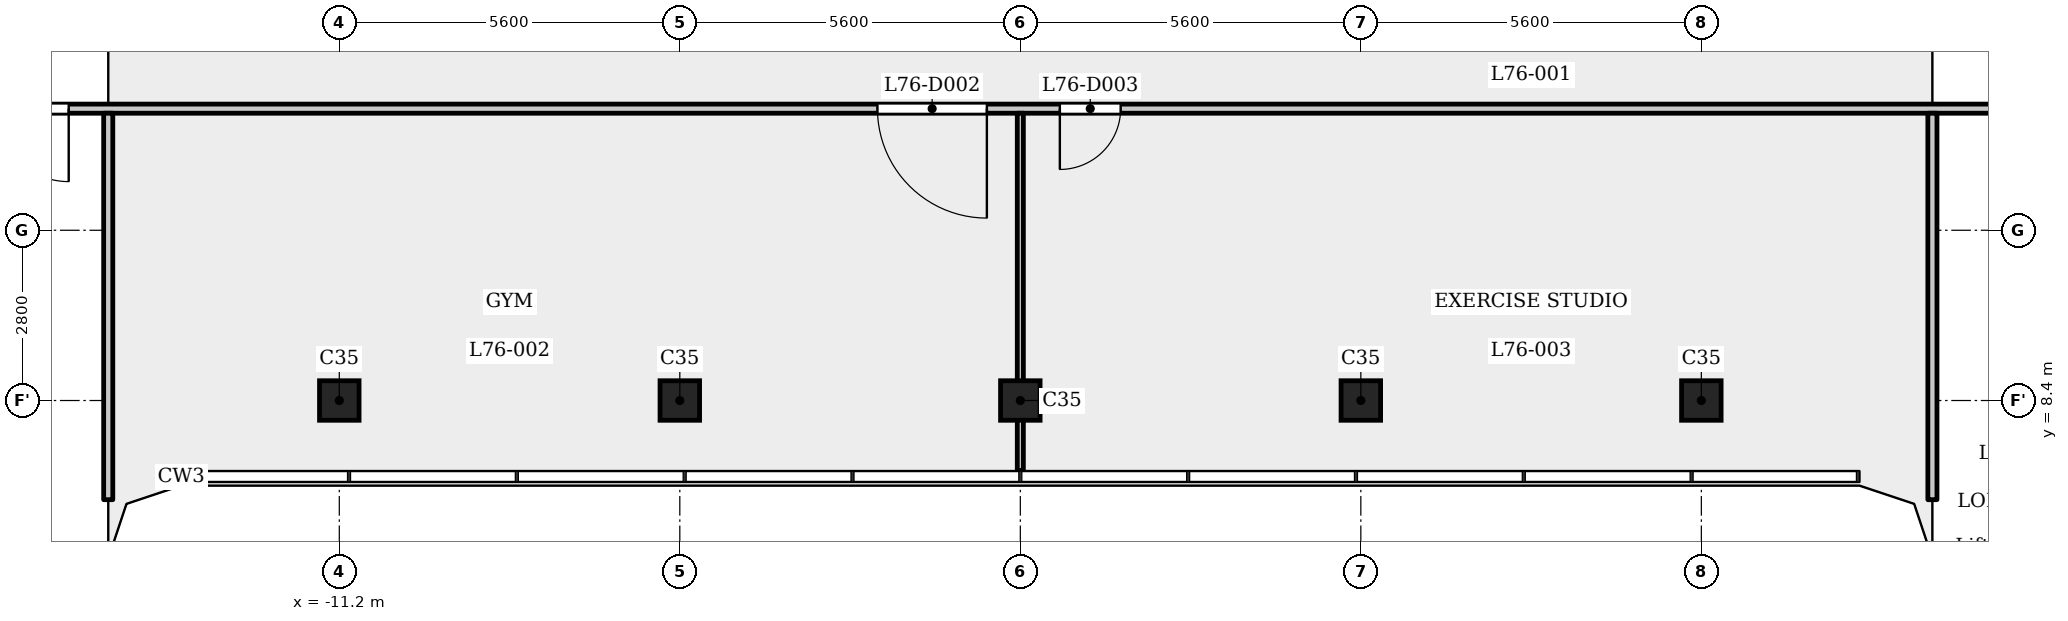
"""IFC4 building model, lengths in metres.
Left out: names, types, materials, properties, quantities, classifications, styles, units other than length and angle.
Written with IfcOpenShell. Run it as: python <this file> out.ifc"""

import sys

from ifc_helpers import new_model, si_unit, direction, frame, frame_2d, origin, origin_2d, place, context, subcontext, project, spatial, polyline, rectangle, outline, extrude, element, fill, save


model = new_model("IFC4")
c1 = context("Model", 3, precision=1e-05, world=origin(), true_north=direction((0.0, 1.0)))
c2 = subcontext(c1, "Body", "Model", "MODEL_VIEW")
j1 = project(units=[si_unit("LENGTHUNIT", "METRE"), si_unit("PLANEANGLEUNIT", "RADIAN")], contexts=[c1])
p1 = place(None, origin())
s1 = spatial("IfcSite", under=j1, at=p1, CompositionType="ELEMENT")
p2 = place(p1, origin())
s2 = spatial("IfcBuilding", under=s1, at=p2, CompositionType="ELEMENT")
p3 = place(p2, frame((0.0, 0.0, 294.5)))
s3 = spatial("IfcBuildingStorey", under=s2, at=p3, CompositionType="ELEMENT", Elevation=294.5)
for number, where, z_axis, x_axis in (
    (1, (-11.2, 8.4, 0.0), (0.0, 0.0, 1.0), (1.0, 0.0, 0.0)),
    (2, (-5.6, 8.4, 0.0), (0.0, 0.0, 1.0), (1.0, 0.0, 0.0)),
    (3, (0.0, 8.4, 0.0), (0.0, 0.0, 1.0), (1.0, 0.0, 0.0)),
    (4, (5.6, 8.4, 0.0), (0.0, 0.0, 1.0), (1.0, 0.0, 0.0)),
    (5, (11.2, 8.4, 0.0), (0.0, 0.0, 1.0), (1.0, 0.0, 0.0)),
):
    element("IfcColumn", number, at=place(p3, frame(where, z_axis=z_axis, x_axis=x_axis)), inside=s3, PredefinedType="COLUMN", context=c2, shape_type="SweptSolid", body=[
        extrude(rectangle(XDim=0.65, YDim=0.65, at=origin_2d()), origin(), (0.0, 0.0, 1.0), 5.4),
    ])
p4 = place(p3, frame((-17.4, 13.2, 0.0), z_axis=(0.0, 0.0, 1.0), x_axis=(1.0, 0.0, 0.0)))
e6 = element("IfcWall", 6, at=p4, inside=s3, PredefinedType="PARTITIONING", context=c2, shape_type="SweptSolid", body=[
    extrude(rectangle(XDim=34.8, YDim=0.15, at=frame_2d((17.4, 0.0))), origin(), (0.0, 0.0, 1.0), 4.6),
])
p5 = place(p4, frame((0.55, 0.0, 0.0)))
e7 = element("IfcOpeningElement", 7, at=p5, cuts=e6, PredefinedType="OPENING", context=c2, shape_type="SweptSolid", body=[
    extrude(rectangle(XDim=1.2, YDim=2.1, at=frame_2d((0.6, 1.05))), frame((0.0, 0.085, 0.0), z_axis=(0.0, -1.0, 0.0), x_axis=(1.0, 0.0, 0.0)), (0.0, 0.0, 1.0), 0.17),
])
p6 = place(p4, frame((15.05, 0.0, 0.0)))
e8 = element("IfcOpeningElement", 8, at=p6, cuts=e6, PredefinedType="OPENING", context=c2, shape_type="SweptSolid", body=[
    extrude(rectangle(XDim=1.8, YDim=2.1, at=frame_2d((0.9, 1.05))), frame((0.0, 0.085, 0.0), z_axis=(0.0, -1.0, 0.0), x_axis=(1.0, 0.0, 0.0)), (0.0, 0.0, 1.0), 0.17),
])
p7 = place(p4, frame((18.05, 0.0, 0.0)))
e9 = element("IfcOpeningElement", 9, at=p7, cuts=e6, PredefinedType="OPENING", context=c2, shape_type="SweptSolid", body=[
    extrude(rectangle(XDim=1.0, YDim=2.1, at=frame_2d((0.5, 1.05))), frame((0.0, 0.085, 0.0), z_axis=(0.0, -1.0, 0.0), x_axis=(1.0, 0.0, 0.0)), (0.0, 0.0, 1.0), 0.17),
])
p8 = place(p3, frame((-15.0, 6.769, 0.0), z_axis=(0.0, 0.0, 1.0), x_axis=(0.0, 1.0, 0.0)))
e10 = element("IfcWall", 10, at=p8, inside=s3, PredefinedType="PARTITIONING", context=c2, shape_type="SweptSolid", body=[
    extrude(rectangle(XDim=6.356, YDim=0.15, at=frame_2d((3.178, 0.0))), origin(), (0.0, 0.0, 1.0), 4.6),
])
p9 = place(p3, frame((0.0, 7.25, 0.0), z_axis=(0.0, 0.0, 1.0), x_axis=(0.0, 1.0, 0.0)))
e11 = element("IfcWall", 11, at=p9, inside=s3, PredefinedType="PARTITIONING", context=c2, shape_type="SweptSolid", body=[
    extrude(rectangle(XDim=5.875, YDim=0.1, at=frame_2d((2.938, 0.0))), origin(), (0.0, 0.0, 1.0), 4.6),
])
p10 = place(p3, frame((15.0, 6.769, 0.0), z_axis=(0.0, 0.0, 1.0), x_axis=(0.0, 1.0, 0.0)))
e12 = element("IfcWall", 12, at=p10, inside=s3, PredefinedType="PARTITIONING", context=c2, shape_type="SweptSolid", body=[
    extrude(rectangle(XDim=6.356, YDim=0.15, at=frame_2d((3.178, 0.0))), origin(), (0.0, 0.0, 1.0), 4.6),
])
p11 = place(p3, origin())
e13 = element("IfcWall", 13, at=p11, inside=s3, PredefinedType="SOLIDWALL", context=c2, shape_type="SweptSolid", body=[
    extrude(outline(polyline([(-13.849, 7.3), (-14.937, 6.937), (-15.3, 5.849), (-15.3, 5.8), (-15.0, 5.8), (-14.7, 6.7), (-13.8, 7.0), (-13.8, 7.3), (-13.849, 7.3)])), origin(), (0.0, 0.0, 1.0), 4.6),
])
e14 = element("IfcWall", 14, at=p11, inside=s3, PredefinedType="SOLIDWALL", context=c2, shape_type="SweptSolid", body=[
    extrude(outline(polyline([(14.937, 6.937), (13.849, 7.3), (13.8, 7.3), (13.8, 7.0), (14.7, 6.7), (15.0, 5.8), (15.3, 5.8), (15.3, 5.849), (14.937, 6.937)])), origin(), (0.0, 0.0, 1.0), 4.6),
])
p12 = place(p5, origin())
e15 = element("IfcDoor", 15, at=p12, inside=s3, OperationType="SINGLE_SWING_RIGHT", PredefinedType="DOOR", context=c2, shape_type="SweptSolid", body=[
    extrude(rectangle(XDim=1.2, YDim=2.1, at=frame_2d((0.6, 1.05))), frame((0.0, 0.025, 0.0), z_axis=(0.0, -1.0, 0.0), x_axis=(1.0, 0.0, 0.0)), (0.0, 0.0, 1.0), 0.05),
])
fill(e7, e15)
p13 = place(p6, origin())
e16 = element("IfcDoor", 16, at=p13, inside=s3, OperationType="SINGLE_SWING_RIGHT", PredefinedType="DOOR", context=c2, shape_type="SweptSolid", body=[
    extrude(rectangle(XDim=1.8, YDim=2.1, at=frame_2d((0.9, 1.05))), frame((0.0, 0.025, 0.0), z_axis=(0.0, -1.0, 0.0), x_axis=(1.0, 0.0, 0.0)), (0.0, 0.0, 1.0), 0.05),
])
fill(e8, e16)
p14 = place(p7, origin())
e17 = element("IfcDoor", 17, at=p14, inside=s3, OperationType="SINGLE_SWING_LEFT", PredefinedType="DOOR", context=c2, shape_type="SweptSolid", body=[
    extrude(rectangle(XDim=1.0, YDim=2.1, at=frame_2d((0.5, 1.05))), frame((0.0, 0.025, 0.0), z_axis=(0.0, -1.0, 0.0), x_axis=(1.0, 0.0, 0.0)), (0.0, 0.0, 1.0), 0.05),
])
fill(e9, e17)
save(model, sys.argv[1])
